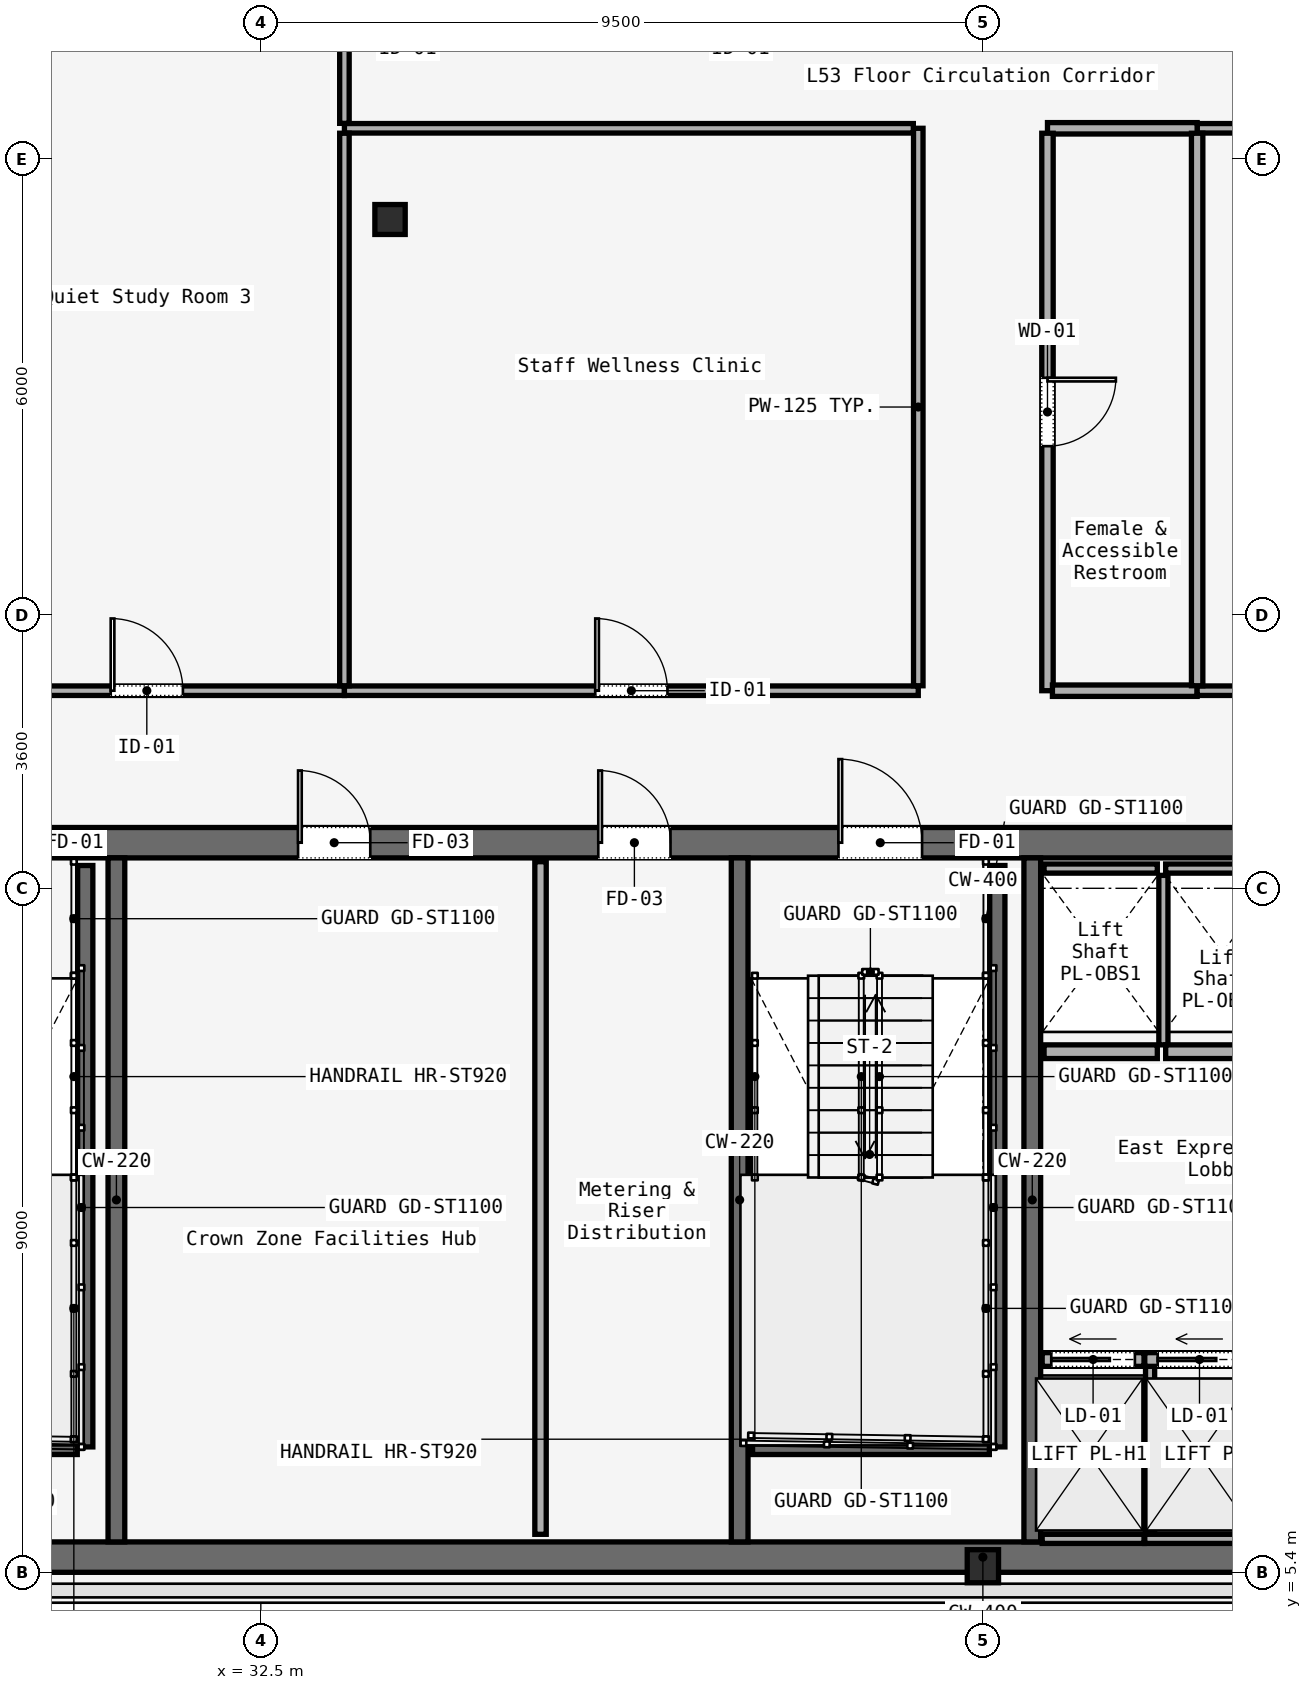
"""IFC4 building model, lengths in metres.
Left out: names, types, materials, properties, quantities, classifications, styles, units other than length and angle.
Written with IfcOpenShell. Run it as: python <this file> out.ifc"""

import sys

from ifc_helpers import new_model, si_unit, direction, frame, frame_2d, origin, origin_2d, place, context, subcontext, project, spatial, rectangle, i_section, extrude, element, fill, save


model = new_model("IFC4")
c1 = context("Model", 3, precision=1e-05, world=origin(), true_north=direction((0.0, 1.0)))
c2 = subcontext(c1, "Body", "Model", "MODEL_VIEW")
j1 = project(units=[si_unit("LENGTHUNIT", "METRE"), si_unit("PLANEANGLEUNIT", "RADIAN")], contexts=[c1])
p1 = place(None, origin())
s1 = spatial("IfcSite", under=j1, at=p1, CompositionType="ELEMENT")
p2 = place(p1, origin())
s2 = spatial("IfcBuilding", under=s1, at=p2, CompositionType="ELEMENT")
p3 = place(p2, frame((0.0, 0.0, 221.8)))
s3 = spatial("IfcBuildingStorey", under=s2, at=p3, CompositionType="ELEMENT", Elevation=221.8)
p4 = place(p3, frame((26.45, 15.0, 0.0), z_axis=(0.0, 0.0, 1.0), x_axis=(1.0, 0.0, 0.0)))
e1 = element("IfcWall", 1, at=p4, inside=s3, PredefinedType="SOLIDWALL", context=c2, shape_type="SweptSolid", body=[
    extrude(rectangle(XDim=31.1, YDim=0.4, at=frame_2d((15.55, 0.0))), origin(), (0.0, 0.0, 1.0), 3.58),
])
p5 = place(p4, frame((1.65, 0.0, 0.0)))
e2 = element("IfcOpeningElement", 2, at=p5, cuts=e1, PredefinedType="OPENING", context=c2, shape_type="SweptSolid", body=[
    extrude(rectangle(XDim=1.1, YDim=2.2, at=frame_2d((0.55, 1.1))), frame((0.0, 0.2, 0.0), z_axis=(0.0, -1.0, 0.0), x_axis=(1.0, 0.0, 0.0)), (0.0, 0.0, 1.0), 0.4),
])
p6 = place(p4, frame((13.65, 0.0, 0.0)))
e3 = element("IfcOpeningElement", 3, at=p6, cuts=e1, PredefinedType="OPENING", context=c2, shape_type="SweptSolid", body=[
    extrude(rectangle(XDim=1.1, YDim=2.2, at=frame_2d((0.55, 1.1))), frame((0.0, 0.2, 0.0), z_axis=(0.0, -1.0, 0.0), x_axis=(1.0, 0.0, 0.0)), (0.0, 0.0, 1.0), 0.4),
])
p7 = place(p4, frame((25.55, 0.0, 0.0)))
e4 = element("IfcOpeningElement", 4, at=p7, cuts=e1, PredefinedType="OPENING", context=c2, shape_type="SweptSolid", body=[
    extrude(rectangle(XDim=1.1, YDim=2.2, at=frame_2d((0.55, 1.1))), frame((0.0, 0.2, 0.0), z_axis=(0.0, -1.0, 0.0), x_axis=(1.0, 0.0, 0.0)), (0.0, 0.0, 1.0), 0.4),
])
p8 = place(p4, frame((19.35, 0.0, 0.0)))
e5 = element("IfcOpeningElement", 5, at=p8, cuts=e1, PredefinedType="OPENING", context=c2, shape_type="SweptSolid", body=[
    extrude(rectangle(XDim=1.1, YDim=2.2, at=frame_2d((0.55, 1.1))), frame((0.0, 0.2, 0.0), z_axis=(0.0, -1.0, 0.0), x_axis=(1.0, 0.0, 0.0)), (0.0, 0.0, 1.0), 0.4),
])
p9 = place(p4, frame((21.4, 0.0, 0.0)))
e6 = element("IfcOpeningElement", 6, at=p9, cuts=e1, PredefinedType="OPENING", context=c2, shape_type="SweptSolid", body=[
    extrude(rectangle(XDim=0.9, YDim=2.1, at=frame_2d((0.45, 1.05))), frame((0.0, 0.2, 0.0), z_axis=(0.0, -1.0, 0.0), x_axis=(1.0, 0.0, 0.0)), (0.0, 0.0, 1.0), 0.4),
])
p10 = place(p4, frame((6.54, 0.0, 0.0)))
e7 = element("IfcOpeningElement", 7, at=p10, cuts=e1, PredefinedType="OPENING", context=c2, shape_type="SweptSolid", body=[
    extrude(rectangle(XDim=0.95, YDim=2.2, at=frame_2d((0.475, 1.1))), frame((0.0, 0.2, 0.0), z_axis=(0.0, -1.0, 0.0), x_axis=(1.0, 0.0, 0.0)), (0.0, 0.0, 1.0), 0.4),
])
p11 = place(p4, frame((10.49, 0.0, 0.0)))
e8 = element("IfcOpeningElement", 8, at=p11, cuts=e1, PredefinedType="OPENING", context=c2, shape_type="SweptSolid", body=[
    extrude(rectangle(XDim=0.95, YDim=2.2, at=frame_2d((0.475, 1.1))), frame((0.0, 0.2, 0.0), z_axis=(0.0, -1.0, 0.0), x_axis=(1.0, 0.0, 0.0)), (0.0, 0.0, 1.0), 0.4),
])
p12 = place(p4, frame((23.35, 0.0, 0.0)))
e9 = element("IfcOpeningElement", 9, at=p12, cuts=e1, PredefinedType="OPENING", context=c2, shape_type="SweptSolid", body=[
    extrude(rectangle(XDim=1.3, YDim=2.3, at=frame_2d((0.65, 1.15))), frame((0.0, 0.2, 0.0), z_axis=(0.0, -1.0, 0.0), x_axis=(1.0, 0.0, 0.0)), (0.0, 0.0, 1.0), 0.4),
])
p13 = place(p3, frame((26.45, 5.6, 0.0), z_axis=(0.0, 0.0, 1.0), x_axis=(1.0, 0.0, 0.0)))
e10 = element("IfcWall", 10, at=p13, inside=s3, PredefinedType="SOLIDWALL", context=c2, shape_type="SweptSolid", body=[
    extrude(rectangle(XDim=31.1, YDim=0.4, at=frame_2d((15.55, 0.0))), origin(), (0.0, 0.0, 1.0), 3.58),
])
for number, where, z_axis, x_axis in (
    (11, (30.6, 5.8, 0.0), (0.0, 0.0, 1.0), (0.0, 1.0, 0.0)),
    (12, (38.8, 5.8, 0.0), (0.0, 0.0, 1.0), (0.0, 1.0, 0.0)),
    (13, (42.65, 5.8, 0.0), (0.0, 0.0, 1.0), (0.0, 1.0, 0.0)),
):
    element("IfcWall", number, at=place(p3, frame(where, z_axis=z_axis, x_axis=x_axis)), inside=s3, PredefinedType="SOLIDWALL", context=c2, shape_type="SweptSolid", body=[
        extrude(rectangle(XDim=9.0, YDim=0.22, at=frame_2d((4.5, 0.0))), origin(), (0.0, 0.0, 1.0), 3.58),
    ])
p14 = place(p3, frame((34.2, 23.2, 0.0), z_axis=(0.0, 0.0, 1.0), x_axis=(1.0, 0.0, 0.0)))
e14 = element("IfcColumn", 14, at=p14, inside=s3, PredefinedType="COLUMN", context=c2, shape_type="SweptSolid", body=[
    extrude(i_section(OverallWidth=0.399, OverallDepth=0.394, WebThickness=0.023, FlangeThickness=0.037, FilletRadius=0.015, at=origin_2d()), origin(), (0.0, 0.0, 1.0), 3.58),
])
p15 = place(p3, frame((42.0, 5.48, 0.0), z_axis=(0.0, 0.0, 1.0), x_axis=(1.0, 0.0, 0.0)))
e15 = element("IfcColumn", 15, at=p15, inside=s3, PredefinedType="COLUMN", context=c2, shape_type="SweptSolid", body=[
    extrude(i_section(OverallWidth=0.412, OverallDepth=0.435, WebThickness=0.036, FlangeThickness=0.044, FilletRadius=0.015, at=origin_2d()), origin(), (0.0, 0.0, 1.0), 3.58),
])
p16 = place(p3, frame((30.19, 14.7, 0.0), z_axis=(0.0, 0.0, 1.0), x_axis=(0.0, -1.0, 0.0)))
e16 = element("IfcWall", 16, at=p16, inside=s3, PredefinedType="SOLIDWALL", context=c2, shape_type="SweptSolid", body=[
    extrude(rectangle(XDim=7.65, YDim=0.2, at=frame_2d((3.825, 0.0))), origin(), (0.0, 0.0, 1.0), 3.8),
])
p17 = place(p3, frame((26.97, 7.05, 0.0), z_axis=(0.0, 0.0, 1.0), x_axis=(1.0, 0.0, 0.0)))
e17 = element("IfcWall", 17, at=p17, inside=s3, PredefinedType="SOLIDWALL", context=c2, shape_type="SweptSolid", body=[
    extrude(rectangle(XDim=3.115, YDim=0.2, at=frame_2d((1.558, 0.0))), origin(), (0.0, 0.0, 1.0), 3.8),
])
p18 = place(p3, frame((42.19, 14.7, 0.0), z_axis=(0.0, 0.0, 1.0), x_axis=(0.0, -1.0, 0.0)))
e18 = element("IfcWall", 18, at=p18, inside=s3, PredefinedType="SOLIDWALL", context=c2, shape_type="SweptSolid", body=[
    extrude(rectangle(XDim=7.65, YDim=0.2, at=frame_2d((3.825, 0.0))), origin(), (0.0, 0.0, 1.0), 3.8),
])
p19 = place(p3, frame((38.97, 7.05, 0.0), z_axis=(0.0, 0.0, 1.0), x_axis=(1.0, 0.0, 0.0)))
e19 = element("IfcWall", 19, at=p19, inside=s3, PredefinedType="SOLIDWALL", context=c2, shape_type="SweptSolid", body=[
    extrude(rectangle(XDim=3.115, YDim=0.2, at=frame_2d((1.558, 0.0))), origin(), (0.0, 0.0, 1.0), 3.8),
])
p20 = place(p3, frame((36.18, 5.9, 0.0), z_axis=(0.0, 0.0, 1.0), x_axis=(0.0, 1.0, 0.0)))
e20 = element("IfcWall", 20, at=p20, inside=s3, PredefinedType="PARTITIONING", context=c2, shape_type="SweptSolid", body=[
    extrude(rectangle(XDim=8.85, YDim=0.15, at=frame_2d((4.425, 0.0))), origin(), (0.0, 0.0, 1.0), 3.01),
])
p21 = place(p3, frame((42.78, 8.2, 0.0), z_axis=(0.0, 0.0, 1.0), x_axis=(1.0, 0.0, 0.0)))
e21 = element("IfcWall", 21, at=p21, inside=s3, PredefinedType="SOLIDWALL", context=c2, shape_type="SweptSolid", body=[
    extrude(rectangle(XDim=1.34, YDim=0.18, at=frame_2d((0.67, 0.0))), origin(), (0.0, 0.0, 1.0), 3.01),
])
p22 = place(p21, frame((0.12, 0.0, 0.0)))
e22 = element("IfcOpeningElement", 22, at=p22, cuts=e21, PredefinedType="OPENING", context=c2, shape_type="SweptSolid", body=[
    extrude(rectangle(XDim=1.1, YDim=2.2, at=frame_2d((0.55, 1.1))), frame((0.0, 0.09, 0.0), z_axis=(0.0, -1.0, 0.0), x_axis=(1.0, 0.0, 0.0)), (0.0, 0.0, 1.0), 0.18),
])
p23 = place(p3, frame((42.78, 5.84, 0.0), z_axis=(0.0, 0.0, 1.0), x_axis=(1.0, 0.0, 0.0)))
e23 = element("IfcWall", 23, at=p23, inside=s3, PredefinedType="SOLIDWALL", context=c2, shape_type="SweptSolid", body=[
    extrude(rectangle(XDim=1.34, YDim=0.12, at=frame_2d((0.67, 0.0))), origin(), (0.0, 0.0, 1.0), 3.01),
])
p24 = place(p3, frame((44.2, 5.93, 0.0), z_axis=(0.0, 0.0, 1.0), x_axis=(0.0, 1.0, 0.0)))
e24 = element("IfcWall", 24, at=p24, inside=s3, PredefinedType="SOLIDWALL", context=c2, shape_type="SweptSolid", body=[
    extrude(rectangle(XDim=2.18, YDim=0.12, at=frame_2d((1.09, 0.0))), origin(), (0.0, 0.0, 1.0), 3.01),
])
p25 = place(p3, frame((44.13, 8.2, 0.0), z_axis=(0.0, 0.0, 1.0), x_axis=(1.0, 0.0, 0.0)))
e25 = element("IfcWall", 25, at=p25, inside=s3, PredefinedType="SOLIDWALL", context=c2, shape_type="SweptSolid", body=[
    extrude(rectangle(XDim=1.44, YDim=0.18, at=frame_2d((0.72, 0.0))), origin(), (0.0, 0.0, 1.0), 3.01),
])
p26 = place(p25, frame((0.17, 0.0, 0.0)))
e26 = element("IfcOpeningElement", 26, at=p26, cuts=e25, PredefinedType="OPENING", context=c2, shape_type="SweptSolid", body=[
    extrude(rectangle(XDim=1.1, YDim=2.2, at=frame_2d((0.55, 1.1))), frame((0.0, 0.09, 0.0), z_axis=(0.0, -1.0, 0.0), x_axis=(1.0, 0.0, 0.0)), (0.0, 0.0, 1.0), 0.18),
])
p27 = place(p3, frame((44.13, 5.84, 0.0), z_axis=(0.0, 0.0, 1.0), x_axis=(1.0, 0.0, 0.0)))
e27 = element("IfcWall", 27, at=p27, inside=s3, PredefinedType="SOLIDWALL", context=c2, shape_type="SweptSolid", body=[
    extrude(rectangle(XDim=1.44, YDim=0.12, at=frame_2d((0.72, 0.0))), origin(), (0.0, 0.0, 1.0), 3.01),
])
p28 = place(p3, frame((42.805, 12.25, 0.0), z_axis=(0.0, 0.0, 1.0), x_axis=(1.0, 0.0, 0.0)))
e28 = element("IfcWall", 28, at=p28, inside=s3, PredefinedType="SOLIDWALL", context=c2, shape_type="SweptSolid", body=[
    extrude(rectangle(XDim=1.49, YDim=0.18, at=frame_2d((0.745, 0.0))), origin(), (0.0, 0.0, 1.0), 3.01),
])
p29 = place(p3, frame((42.805, 14.66, 0.0), z_axis=(0.0, 0.0, 1.0), x_axis=(1.0, 0.0, 0.0)))
e29 = element("IfcWall", 29, at=p29, inside=s3, PredefinedType="SOLIDWALL", context=c2, shape_type="SweptSolid", body=[
    extrude(rectangle(XDim=1.49, YDim=0.12, at=frame_2d((0.745, 0.0))), origin(), (0.0, 0.0, 1.0), 3.01),
])
p30 = place(p3, frame((44.375, 12.34, 0.0), z_axis=(0.0, 0.0, 1.0), x_axis=(0.0, 1.0, 0.0)))
e30 = element("IfcWall", 30, at=p30, inside=s3, PredefinedType="SOLIDWALL", context=c2, shape_type="SweptSolid", body=[
    extrude(rectangle(XDim=2.23, YDim=0.12, at=frame_2d((1.115, 0.0))), origin(), (0.0, 0.0, 1.0), 3.01),
])
p31 = place(p3, frame((44.405, 12.25, 0.0), z_axis=(0.0, 0.0, 1.0), x_axis=(1.0, 0.0, 0.0)))
e31 = element("IfcWall", 31, at=p31, inside=s3, PredefinedType="SOLIDWALL", context=c2, shape_type="SweptSolid", body=[
    extrude(rectangle(XDim=1.49, YDim=0.18, at=frame_2d((0.745, 0.0))), origin(), (0.0, 0.0, 1.0), 3.01),
])
p32 = place(p3, frame((44.405, 14.66, 0.0), z_axis=(0.0, 0.0, 1.0), x_axis=(1.0, 0.0, 0.0)))
e32 = element("IfcWall", 32, at=p32, inside=s3, PredefinedType="SOLIDWALL", context=c2, shape_type="SweptSolid", body=[
    extrude(rectangle(XDim=1.49, YDim=0.12, at=frame_2d((0.745, 0.0))), origin(), (0.0, 0.0, 1.0), 3.01),
])
p33 = place(p3, frame((28.4, 17.0, 0.0), z_axis=(0.0, 0.0, 1.0), x_axis=(1.0, 0.0, 0.0)))
e33 = element("IfcWall", 33, at=p33, inside=s3, PredefinedType="PARTITIONING", context=c2, shape_type="SweptSolid", body=[
    extrude(rectangle(XDim=5.2, YDim=0.125, at=frame_2d((2.6, 0.0))), origin(), (0.0, 0.0, 1.0), 3.01),
])
p34 = place(p33, frame((2.125, 0.0, 0.0)))
e34 = element("IfcOpeningElement", 34, at=p34, cuts=e33, PredefinedType="OPENING", context=c2, shape_type="SweptSolid", body=[
    extrude(rectangle(XDim=0.95, YDim=2.2, at=frame_2d((0.475, 1.1))), frame((0.0, 0.062, 0.0), z_axis=(0.0, -1.0, 0.0), x_axis=(1.0, 0.0, 0.0)), (0.0, 0.0, 1.0), 0.125),
])
p35 = place(p3, frame((33.6, 17.0, 0.0), z_axis=(0.0, 0.0, 1.0), x_axis=(1.0, 0.0, 0.0)))
e35 = element("IfcWall", 35, at=p35, inside=s3, PredefinedType="PARTITIONING", context=c2, shape_type="SweptSolid", body=[
    extrude(rectangle(XDim=7.55, YDim=0.125, at=frame_2d((3.775, 0.0))), origin(), (0.0, 0.0, 1.0), 3.01),
])
p36 = place(p35, frame((3.3, 0.0, 0.0)))
e36 = element("IfcOpeningElement", 36, at=p36, cuts=e35, PredefinedType="OPENING", context=c2, shape_type="SweptSolid", body=[
    extrude(rectangle(XDim=0.95, YDim=2.2, at=frame_2d((0.475, 1.1))), frame((0.0, 0.062, 0.0), z_axis=(0.0, -1.0, 0.0), x_axis=(1.0, 0.0, 0.0)), (0.0, 0.0, 1.0), 0.125),
])
p37 = place(p3, frame((41.15, 17.065, 0.0), z_axis=(0.0, 0.0, 1.0), x_axis=(0.0, 1.0, 0.0)))
e37 = element("IfcWall", 37, at=p37, inside=s3, PredefinedType="PARTITIONING", context=c2, shape_type="SweptSolid", body=[
    extrude(rectangle(XDim=7.335, YDim=0.125, at=frame_2d((3.667, 0.0))), origin(), (0.0, 0.0, 1.0), 3.01),
])
p38 = place(p3, frame((41.085, 24.4, 0.0), z_axis=(0.0, 0.0, 1.0), x_axis=(-1.0, 0.0, 0.0)))
e38 = element("IfcWall", 38, at=p38, inside=s3, PredefinedType="PARTITIONING", context=c2, shape_type="SweptSolid", body=[
    extrude(rectangle(XDim=7.485, YDim=0.125, at=frame_2d((3.742, 0.0))), origin(), (0.0, 0.0, 1.0), 3.01),
])
p39 = place(p3, frame((33.6, 24.465, 0.0), z_axis=(0.0, 0.0, 1.0), x_axis=(0.0, 1.0, 0.0)))
e39 = element("IfcWall", 39, at=p39, inside=s3, PredefinedType="PARTITIONING", context=c2, shape_type="SweptSolid", body=[
    extrude(rectangle(XDim=1.735, YDim=0.125, at=frame_2d((0.867, 0.0))), origin(), (0.0, 0.0, 1.0), 3.01),
])
p40 = place(p3, frame((51.735, 24.4, 0.0), z_axis=(0.0, 0.0, 1.0), x_axis=(-1.0, 0.0, 0.0)))
e40 = element("IfcWall", 40, at=p40, inside=s3, PredefinedType="PARTITIONING", context=c2, shape_type="SweptSolid", body=[
    extrude(rectangle(XDim=6.916, YDim=0.125, at=frame_2d((3.458, 0.0))), origin(), (0.0, 0.0, 1.0), 3.01),
])
p41 = place(p3, frame((44.819, 24.4, 0.0), z_axis=(0.0, 0.0, 1.0), x_axis=(-1.0, 0.0, 0.0)))
e41 = element("IfcWall", 41, at=p41, inside=s3, PredefinedType="PARTITIONING", context=c2, shape_type="SweptSolid", body=[
    extrude(rectangle(XDim=1.969, YDim=0.15, at=frame_2d((0.984, 0.0))), origin(), (0.0, 0.0, 1.0), 3.01),
])
p42 = place(p3, frame((42.85, 24.335, 0.0), z_axis=(0.0, 0.0, 1.0), x_axis=(0.0, -1.0, 0.0)))
e42 = element("IfcWall", 42, at=p42, inside=s3, PredefinedType="PARTITIONING", context=c2, shape_type="SweptSolid", body=[
    extrude(rectangle(XDim=7.335, YDim=0.15, at=frame_2d((3.667, 0.0))), origin(), (0.0, 0.0, 1.0), 3.01),
])
p43 = place(p42, frame((3.218, 0.0, 0.0)))
e43 = element("IfcOpeningElement", 43, at=p43, cuts=e42, PredefinedType="OPENING", context=c2, shape_type="SweptSolid", body=[
    extrude(rectangle(XDim=0.9, YDim=2.15, at=frame_2d((0.45, 1.075))), frame((0.0, 0.075, 0.0), z_axis=(0.0, -1.0, 0.0), x_axis=(1.0, 0.0, 0.0)), (0.0, 0.0, 1.0), 0.15),
])
p44 = place(p3, frame((42.915, 17.0, 0.0), z_axis=(0.0, 0.0, 1.0), x_axis=(1.0, 0.0, 0.0)))
e44 = element("IfcWall", 44, at=p44, inside=s3, PredefinedType="PARTITIONING", context=c2, shape_type="SweptSolid", body=[
    extrude(rectangle(XDim=1.904, YDim=0.15, at=frame_2d((0.952, 0.0))), origin(), (0.0, 0.0, 1.0), 3.01),
])
p45 = place(p3, frame((44.819, 17.0, 0.0), z_axis=(0.0, 0.0, 1.0), x_axis=(1.0, 0.0, 0.0)))
e45 = element("IfcWall", 45, at=p45, inside=s3, PredefinedType="PARTITIONING", context=c2, shape_type="SweptSolid", body=[
    extrude(rectangle(XDim=6.981, YDim=0.125, at=frame_2d((3.49, 0.0))), origin(), (0.0, 0.0, 1.0), 3.01),
])
p46 = place(p45, frame((3.015, 0.0, 0.0)))
e46 = element("IfcOpeningElement", 46, at=p46, cuts=e45, PredefinedType="OPENING", context=c2, shape_type="SweptSolid", body=[
    extrude(rectangle(XDim=0.95, YDim=2.2, at=frame_2d((0.475, 1.1))), frame((0.0, 0.062, 0.0), z_axis=(0.0, -1.0, 0.0), x_axis=(1.0, 0.0, 0.0)), (0.0, 0.0, 1.0), 0.125),
])
p47 = place(p3, frame((33.6, 17.065, 0.0), z_axis=(0.0, 0.0, 1.0), x_axis=(0.0, 1.0, 0.0)))
e47 = element("IfcWall", 47, at=p47, inside=s3, PredefinedType="PARTITIONING", context=c2, shape_type="SweptSolid", body=[
    extrude(rectangle(XDim=7.27, YDim=0.125, at=frame_2d((3.635, 0.0))), origin(), (0.0, 0.0, 1.0), 3.01),
])
p48 = place(p3, frame((44.819, 24.335, 0.0), z_axis=(0.0, 0.0, 1.0), x_axis=(0.0, -1.0, 0.0)))
e48 = element("IfcWall", 48, at=p48, inside=s3, PredefinedType="PARTITIONING", context=c2, shape_type="SweptSolid", body=[
    extrude(rectangle(XDim=7.27, YDim=0.15, at=frame_2d((3.635, 0.0))), origin(), (0.0, 0.0, 1.0), 3.01),
])
p49 = place(p6, origin())
e49 = element("IfcDoor", 49, at=p49, inside=s3, OperationType="SINGLE_SWING_LEFT", PredefinedType="DOOR", context=c2, shape_type="SweptSolid", body=[
    extrude(rectangle(XDim=1.1, YDim=2.2, at=frame_2d((0.55, 1.1))), frame((0.0, 0.025, 0.0), z_axis=(0.0, -1.0, 0.0), x_axis=(1.0, 0.0, 0.0)), (0.0, 0.0, 1.0), 0.05),
])
fill(e3, e49)
p50 = place(p10, origin())
e50 = element("IfcDoor", 50, at=p50, inside=s3, OperationType="SINGLE_SWING_LEFT", PredefinedType="DOOR", context=c2, shape_type="SweptSolid", body=[
    extrude(rectangle(XDim=0.95, YDim=2.2, at=frame_2d((0.475, 1.1))), frame((0.0, 0.025, 0.0), z_axis=(0.0, -1.0, 0.0), x_axis=(1.0, 0.0, 0.0)), (0.0, 0.0, 1.0), 0.05),
])
fill(e7, e50)
p51 = place(p11, origin())
e51 = element("IfcDoor", 51, at=p51, inside=s3, OperationType="SINGLE_SWING_RIGHT", PredefinedType="DOOR", context=c2, shape_type="SweptSolid", body=[
    extrude(rectangle(XDim=0.95, YDim=2.2, at=frame_2d((0.475, 1.1))), frame((0.0, 0.025, 0.0), z_axis=(0.0, -1.0, 0.0), x_axis=(1.0, 0.0, 0.0)), (0.0, 0.0, 1.0), 0.05),
])
fill(e8, e51)
p52 = place(p22, origin())
e52 = element("IfcDoor", 52, at=p52, inside=s3, OperationType="SLIDING_TO_LEFT", PredefinedType="DOOR", context=c2, shape_type="SweptSolid", body=[
    extrude(rectangle(XDim=1.1, YDim=2.2, at=frame_2d((0.55, 1.1))), frame((0.0, 0.025, 0.0), z_axis=(0.0, -1.0, 0.0), x_axis=(1.0, 0.0, 0.0)), (0.0, 0.0, 1.0), 0.05),
])
fill(e22, e52)
p53 = place(p26, origin())
e53 = element("IfcDoor", 53, at=p53, inside=s3, OperationType="SLIDING_TO_LEFT", PredefinedType="DOOR", context=c2, shape_type="SweptSolid", body=[
    extrude(rectangle(XDim=1.1, YDim=2.2, at=frame_2d((0.55, 1.1))), frame((0.0, 0.025, 0.0), z_axis=(0.0, -1.0, 0.0), x_axis=(1.0, 0.0, 0.0)), (0.0, 0.0, 1.0), 0.05),
])
fill(e26, e53)
p54 = place(p36, origin())
e54 = element("IfcDoor", 54, at=p54, inside=s3, OperationType="SINGLE_SWING_RIGHT", PredefinedType="DOOR", context=c2, shape_type="SweptSolid", body=[
    extrude(rectangle(XDim=0.95, YDim=2.2, at=frame_2d((0.475, 1.1))), frame((0.0, 0.025, 0.0), z_axis=(0.0, -1.0, 0.0), x_axis=(1.0, 0.0, 0.0)), (0.0, 0.0, 1.0), 0.05),
])
fill(e36, e54)
p55 = place(p43, origin())
e55 = element("IfcDoor", 55, at=p55, inside=s3, OperationType="SINGLE_SWING_LEFT", PredefinedType="DOOR", context=c2, shape_type="SweptSolid", body=[
    extrude(rectangle(XDim=0.9, YDim=2.15, at=frame_2d((0.45, 1.075))), frame((0.0, 0.025, 0.0), z_axis=(0.0, -1.0, 0.0), x_axis=(1.0, 0.0, 0.0)), (0.0, 0.0, 1.0), 0.05),
])
fill(e43, e55)
p56 = place(p34, origin())
e56 = element("IfcDoor", 56, at=p56, inside=s3, OperationType="SINGLE_SWING_LEFT", PredefinedType="DOOR", context=c2, shape_type="SweptSolid", body=[
    extrude(rectangle(XDim=0.95, YDim=2.2, at=frame_2d((0.475, 1.1))), frame((0.0, 0.025, 0.0), z_axis=(0.0, -1.0, 0.0), x_axis=(1.0, 0.0, 0.0)), (0.0, 0.0, 1.0), 0.05),
])
fill(e34, e56)
save(model, sys.argv[1])
